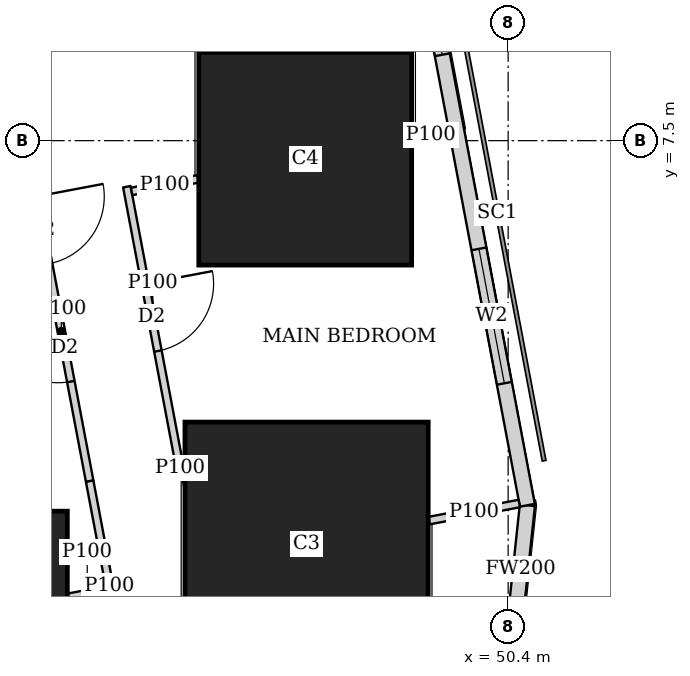
"""IFC4 building model, lengths in metres.
Left out: names, types, materials, properties, quantities, classifications, styles, units other than length and angle.
Written with IfcOpenShell. Run it as: python <this file> out.ifc"""

import sys

from ifc_helpers import new_model, si_unit, direction, frame, frame_2d, origin, origin_2d, place, context, subcontext, project, spatial, rectangle, extrude, element, fill, save


model = new_model("IFC4")
c1 = context("Model", 3, precision=1e-05, world=origin(), true_north=direction((0.0, 1.0)))
c2 = subcontext(c1, "Body", "Model", "MODEL_VIEW")
j1 = project(units=[si_unit("LENGTHUNIT", "METRE"), si_unit("PLANEANGLEUNIT", "RADIAN")], contexts=[c1])
p1 = place(None, origin())
s1 = spatial("IfcSite", under=j1, at=p1, CompositionType="ELEMENT")
p2 = place(p1, origin())
s2 = spatial("IfcBuilding", under=s1, at=p2, CompositionType="ELEMENT")
p3 = place(p2, frame((0.0, 0.0, 65.0)))
s3 = spatial("IfcBuildingStorey", under=s2, at=p3, CompositionType="ELEMENT", Elevation=65.0)
p4 = place(p3, frame((43.2, 1.225, 0.0), z_axis=(0.0, 0.0, 1.0), x_axis=(1.0, 0.0, 0.0)))
e1 = element("IfcColumn", 1, at=p4, inside=s3, PredefinedType="COLUMN", context=c2, shape_type="SweptSolid", body=[
    extrude(rectangle(XDim=2.8, YDim=2.8, at=origin_2d()), origin(), (0.0, 0.0, 1.0), 3.75),
])
p5 = place(p3, frame((47.748, 2.197, 0.0), z_axis=(0.0, 0.0, 1.0), x_axis=(1.0, 0.0, 0.0)))
e2 = element("IfcColumn", 2, at=p5, inside=s3, PredefinedType="COLUMN", context=c2, shape_type="SweptSolid", body=[
    extrude(rectangle(XDim=3.2, YDim=3.2, at=origin_2d()), origin(), (0.0, 0.0, 1.0), 3.75),
])
p6 = place(p3, frame((47.73, 7.263, 0.0), z_axis=(0.0, 0.0, 1.0), x_axis=(1.0, 0.0, 0.0)))
e3 = element("IfcColumn", 3, at=p6, inside=s3, PredefinedType="COLUMN", context=c2, shape_type="SweptSolid", body=[
    extrude(rectangle(XDim=2.8, YDim=2.8, at=origin_2d()), origin(), (0.0, 0.0, 1.0), 3.75),
])
p7 = place(p3, frame((50.474, 1.025, 0.0), z_axis=(0.0, 0.0, 1.0), x_axis=(0.106047815515, 0.994361031429, 0.0)))
e4 = element("IfcWall", 4, at=p7, inside=s3, PredefinedType="SOLIDWALL", context=c2, shape_type="SweptSolid", body=[
    extrude(rectangle(XDim=1.688, YDim=0.2, at=frame_2d((0.844, 0.0))), origin(), (0.0, 0.0, 1.0), 3.5),
])
p8 = place(p3, frame((50.653, 2.703, 0.0), z_axis=(0.0, 0.0, 1.0), x_axis=(-0.185612026696, 0.982623109613, 0.0)))
e5 = element("IfcWall", 5, at=p8, inside=s3, PredefinedType="SOLIDWALL", context=c2, shape_type="SweptSolid", body=[
    extrude(rectangle(XDim=41.393, YDim=0.2, at=frame_2d((20.697, 0.0))), origin(), (0.0, 0.0, 1.0), 3.5),
])
p9 = place(p8, frame((1.633, 0.0, 0.9)))
e6 = element("IfcOpeningElement", 6, at=p9, cuts=e5, PredefinedType="OPENING", context=c2, shape_type="SweptSolid", body=[
    extrude(rectangle(XDim=1.8, YDim=1.5, at=frame_2d((0.9, 0.75))), frame((0.0, 0.11, 0.0), z_axis=(0.0, -1.0, 0.0), x_axis=(1.0, 0.0, 0.0)), (0.0, 0.0, 1.0), 0.22),
])
p10 = place(p8, frame((6.032, 0.0, 0.9)))
e7 = element("IfcOpeningElement", 7, at=p10, cuts=e5, PredefinedType="OPENING", context=c2, shape_type="SweptSolid", body=[
    extrude(rectangle(XDim=1.8, YDim=1.5, at=frame_2d((0.9, 0.75))), frame((0.0, 0.11, 0.0), z_axis=(0.0, -1.0, 0.0), x_axis=(1.0, 0.0, 0.0)), (0.0, 0.0, 1.0), 0.22),
])
p11 = place(p8, frame((9.848, 0.0, 0.9)))
e8 = element("IfcOpeningElement", 8, at=p11, cuts=e5, PredefinedType="OPENING", context=c2, shape_type="SweptSolid", body=[
    extrude(rectangle(XDim=1.8, YDim=1.5, at=frame_2d((0.9, 0.75))), frame((0.0, 0.11, 0.0), z_axis=(0.0, -1.0, 0.0), x_axis=(1.0, 0.0, 0.0)), (0.0, 0.0, 1.0), 0.22),
])
p12 = place(p8, frame((17.481, 0.0, 0.9)))
e9 = element("IfcOpeningElement", 9, at=p12, cuts=e5, PredefinedType="OPENING", context=c2, shape_type="SweptSolid", body=[
    extrude(rectangle(XDim=1.8, YDim=1.5, at=frame_2d((0.9, 0.75))), frame((0.0, 0.11, 0.0), z_axis=(0.0, -1.0, 0.0), x_axis=(1.0, 0.0, 0.0)), (0.0, 0.0, 1.0), 0.22),
])
p13 = place(p8, frame((21.297, 0.0, 0.9)))
e10 = element("IfcOpeningElement", 10, at=p13, cuts=e5, PredefinedType="OPENING", context=c2, shape_type="SweptSolid", body=[
    extrude(rectangle(XDim=1.8, YDim=1.5, at=frame_2d((0.9, 0.75))), frame((0.0, 0.11, 0.0), z_axis=(0.0, -1.0, 0.0), x_axis=(1.0, 0.0, 0.0)), (0.0, 0.0, 1.0), 0.22),
])
p14 = place(p8, frame((25.113, 0.0, 0.9)))
e11 = element("IfcOpeningElement", 11, at=p14, cuts=e5, PredefinedType="OPENING", context=c2, shape_type="SweptSolid", body=[
    extrude(rectangle(XDim=1.8, YDim=1.5, at=frame_2d((0.9, 0.75))), frame((0.0, 0.11, 0.0), z_axis=(0.0, -1.0, 0.0), x_axis=(1.0, 0.0, 0.0)), (0.0, 0.0, 1.0), 0.22),
])
p15 = place(p8, frame((28.93, 0.0, 0.9)))
e12 = element("IfcOpeningElement", 12, at=p15, cuts=e5, PredefinedType="OPENING", context=c2, shape_type="SweptSolid", body=[
    extrude(rectangle(XDim=1.8, YDim=1.5, at=frame_2d((0.9, 0.75))), frame((0.0, 0.11, 0.0), z_axis=(0.0, -1.0, 0.0), x_axis=(1.0, 0.0, 0.0)), (0.0, 0.0, 1.0), 0.22),
])
p16 = place(p8, frame((32.746, 0.0, 0.9)))
e13 = element("IfcOpeningElement", 13, at=p16, cuts=e5, PredefinedType="OPENING", context=c2, shape_type="SweptSolid", body=[
    extrude(rectangle(XDim=1.8, YDim=1.5, at=frame_2d((0.9, 0.75))), frame((0.0, 0.11, 0.0), z_axis=(0.0, -1.0, 0.0), x_axis=(1.0, 0.0, 0.0)), (0.0, 0.0, 1.0), 0.22),
])
p17 = place(p8, frame((36.481, 0.0, 0.9)))
e14 = element("IfcOpeningElement", 14, at=p17, cuts=e5, PredefinedType="OPENING", context=c2, shape_type="SweptSolid", body=[
    extrude(rectangle(XDim=1.8, YDim=1.5, at=frame_2d((0.9, 0.75))), frame((0.0, 0.11, 0.0), z_axis=(0.0, -1.0, 0.0), x_axis=(1.0, 0.0, 0.0)), (0.0, 0.0, 1.0), 0.22),
])
p18 = place(p3, frame((45.383, 6.894, 0.0), z_axis=(0.0, 0.0, 1.0), x_axis=(0.185791461635, -0.982589198385, 0.0)))
e15 = element("IfcWall", 15, at=p18, inside=s3, PredefinedType="PARTITIONING", context=c2, shape_type="SweptSolid", body=[
    extrude(rectangle(XDim=3.687, YDim=0.1, at=frame_2d((1.844, 0.0))), origin(), (0.0, 0.0, 1.0), 3.5),
])
p19 = place(p18, frame((1.3, 0.0, 0.0)))
e16 = element("IfcOpeningElement", 16, at=p19, cuts=e15, PredefinedType="OPENING", context=c2, shape_type="SweptSolid", body=[
    extrude(rectangle(XDim=0.9, YDim=2.1, at=frame_2d((0.45, 1.05))), frame((0.0, 0.06, 0.0), z_axis=(0.0, -1.0, 0.0), x_axis=(1.0, 0.0, 0.0)), (0.0, 0.0, 1.0), 0.12),
])
p20 = place(p3, frame((46.068, 3.271, 0.0), z_axis=(0.0, 0.0, 1.0), x_axis=(0.183590240121, -0.98300286049, 0.0)))
e17 = element("IfcWall", 17, at=p20, inside=s3, PredefinedType="PARTITIONING", context=c2, shape_type="SweptSolid", body=[
    extrude(rectangle(XDim=0.169, YDim=0.1, at=frame_2d((0.084, 0.0))), origin(), (0.0, 0.0, 1.0), 2.05),
])
p21 = place(p3, frame((44.149, 6.96, 0.0), z_axis=(0.0, 0.0, 1.0), x_axis=(0.185824941804, -0.982582867245, 0.0)))
e18 = element("IfcWall", 18, at=p21, inside=s3, PredefinedType="PARTITIONING", context=c2, shape_type="SweptSolid", body=[
    extrude(rectangle(XDim=4.01, YDim=0.1, at=frame_2d((2.005, 0.0))), origin(), (0.0, 0.0, 1.0), 3.5),
])
p22 = place(p21, frame((0.2, 0.0, 0.0)))
e19 = element("IfcOpeningElement", 19, at=p22, cuts=e18, PredefinedType="OPENING", context=c2, shape_type="SweptSolid", body=[
    extrude(rectangle(XDim=0.9, YDim=2.1, at=frame_2d((0.45, 1.05))), frame((0.0, 0.06, 0.0), z_axis=(0.0, -1.0, 0.0), x_axis=(1.0, 0.0, 0.0)), (0.0, 0.0, 1.0), 0.12),
])
p23 = place(p21, frame((1.776, 0.0, 0.0)))
e20 = element("IfcOpeningElement", 20, at=p23, cuts=e18, PredefinedType="OPENING", context=c2, shape_type="SweptSolid", body=[
    extrude(rectangle(XDim=0.9, YDim=2.1, at=frame_2d((0.45, 1.05))), frame((0.0, 0.06, 0.0), z_axis=(0.0, -1.0, 0.0), x_axis=(1.0, 0.0, 0.0)), (0.0, 0.0, 1.0), 0.12),
])
p24 = place(p3, frame((44.894, 3.02, 0.0), z_axis=(0.0, 0.0, 1.0), x_axis=(0.185471317237, -0.982649678412, 0.0)))
e21 = element("IfcWall", 21, at=p24, inside=s3, PredefinedType="PARTITIONING", context=c2, shape_type="SweptSolid", body=[
    extrude(rectangle(XDim=2.804, YDim=0.1, at=frame_2d((1.402, 0.0))), origin(), (0.0, 0.0, 1.0), 2.05),
])
p25 = place(p3, frame((49.622, 7.62, 0.0), z_axis=(0.0, 0.0, 1.0), x_axis=(-0.982629142467, -0.185580086147, 0.0)))
e22 = element("IfcWall", 22, at=p25, inside=s3, PredefinedType="PARTITIONING", context=c2, shape_type="SweptSolid", body=[
    extrude(rectangle(XDim=0.491, YDim=0.1, at=frame_2d((0.245, 0.0))), origin(), (0.0, 0.0, 1.0), 3.5),
])
p26 = place(p3, frame((46.32, 6.997, 0.0), z_axis=(0.0, 0.0, 1.0), x_axis=(-0.982635224332, -0.185547880349, 0.0)))
e23 = element("IfcWall", 23, at=p26, inside=s3, PredefinedType="PARTITIONING", context=c2, shape_type="SweptSolid", body=[
    extrude(rectangle(XDim=0.889, YDim=0.1, at=frame_2d((0.445, 0.0))), origin(), (0.0, 0.0, 1.0), 3.5),
])
p27 = place(p3, frame((50.547, 2.726, 0.0), z_axis=(0.0, 0.0, 1.0), x_axis=(-0.982553313503, -0.185981144539, 0.0)))
e24 = element("IfcWall", 24, at=p27, inside=s3, PredefinedType="PARTITIONING", context=c2, shape_type="SweptSolid", body=[
    extrude(rectangle(XDim=1.21, YDim=0.1, at=frame_2d((0.605, 0.0))), origin(), (0.0, 0.0, 1.0), 3.5),
])
p28 = place(p3, frame((45.114, 1.587, 0.0), z_axis=(0.0, 0.0, 1.0), x_axis=(-0.982699277433, -0.185208342501, 0.0)))
e25 = element("IfcWall", 25, at=p28, inside=s3, PredefinedType="PARTITIONING", context=c2, shape_type="SweptSolid", body=[
    extrude(rectangle(XDim=0.513, YDim=0.1, at=frame_2d((0.256, 0.0))), origin(), (0.0, 0.0, 1.0), 2.05),
])
p29 = place(p9, origin())
e26 = element("IfcWindow", 26, at=p29, inside=s3, PartitioningType="SINGLE_PANEL", PredefinedType="WINDOW", context=c2, shape_type="SweptSolid", body=[
    extrude(rectangle(XDim=1.8, YDim=1.5, at=frame_2d((0.9, 0.75))), frame((0.0, 0.03, 0.0), z_axis=(0.0, -1.0, 0.0), x_axis=(1.0, 0.0, 0.0)), (0.0, 0.0, 1.0), 0.06),
])
fill(e6, e26)
p30 = place(p10, origin())
e27 = element("IfcWindow", 27, at=p30, inside=s3, PartitioningType="SINGLE_PANEL", PredefinedType="WINDOW", context=c2, shape_type="SweptSolid", body=[
    extrude(rectangle(XDim=1.8, YDim=1.5, at=frame_2d((0.9, 0.75))), frame((0.0, 0.03, 0.0), z_axis=(0.0, -1.0, 0.0), x_axis=(1.0, 0.0, 0.0)), (0.0, 0.0, 1.0), 0.06),
])
fill(e7, e27)
p31 = place(p19, origin())
e28 = element("IfcDoor", 28, at=p31, inside=s3, OperationType="SINGLE_SWING_LEFT", PredefinedType="DOOR", context=c2, shape_type="SweptSolid", body=[
    extrude(rectangle(XDim=0.9, YDim=2.1, at=frame_2d((0.45, 1.05))), frame((0.0, 0.025, 0.0), z_axis=(0.0, -1.0, 0.0), x_axis=(1.0, 0.0, 0.0)), (0.0, 0.0, 1.0), 0.05),
])
fill(e16, e28)
p32 = place(p23, origin())
e29 = element("IfcDoor", 29, at=p32, inside=s3, OperationType="SINGLE_SWING_RIGHT", PredefinedType="DOOR", context=c2, shape_type="SweptSolid", body=[
    extrude(rectangle(XDim=0.9, YDim=2.1, at=frame_2d((0.45, 1.05))), frame((0.0, 0.025, 0.0), z_axis=(0.0, -1.0, 0.0), x_axis=(1.0, 0.0, 0.0)), (0.0, 0.0, 1.0), 0.05),
])
fill(e20, e29)
save(model, sys.argv[1])
